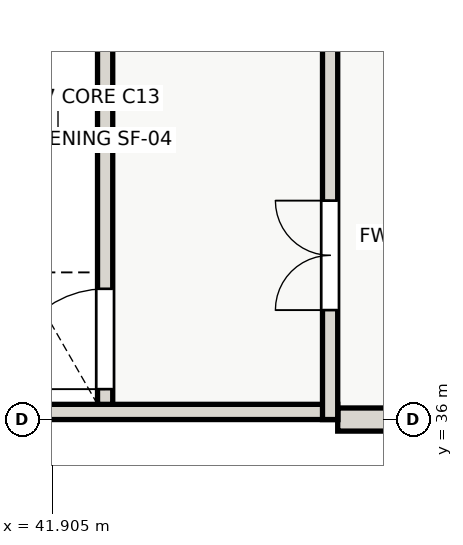
"""IFC4 building model, lengths in metres.
Left out: names, types, materials, properties, quantities, classifications, styles, units other than length and angle.
Written with IfcOpenShell. Run it as: python <this file> out.ifc"""

import sys

from ifc_helpers import new_model, si_unit, direction, frame, frame_2d, origin, place, context, subcontext, project, spatial, rectangle, extrude, element, fill, save


model = new_model("IFC4")
c1 = context("Model", 3, precision=1e-05, world=origin(), true_north=direction((0.0, 1.0)))
c2 = subcontext(c1, "Body", "Model", "MODEL_VIEW")
j1 = project(units=[si_unit("LENGTHUNIT", "METRE"), si_unit("PLANEANGLEUNIT", "RADIAN")], contexts=[c1])
p1 = place(None, origin())
s1 = spatial("IfcSite", under=j1, at=p1, CompositionType="ELEMENT")
p2 = place(p1, origin())
s2 = spatial("IfcBuilding", under=s1, at=p2, CompositionType="ELEMENT")
p3 = place(p2, frame((0.0, 0.0, 8.4)))
s3 = spatial("IfcBuildingStorey", under=s2, at=p3, CompositionType="ELEMENT", Elevation=8.4)
p4 = place(p3, frame((48.0, 36.0, 0.0), z_axis=(0.0, 0.0, 1.0), x_axis=(-1.0, 0.0, 0.0)))
e1 = element("IfcWall", 1, at=p4, inside=s3, PredefinedType="SOLIDWALL", context=c2, shape_type="SweptSolid", body=[
    extrude(rectangle(XDim=1.4, YDim=0.38, at=frame_2d((0.7, 0.0))), origin(), (0.0, 0.0, 1.0), 3.69),
])
p5 = place(p3, frame((46.6, 36.125, 0.0), z_axis=(0.0, 0.0, 1.0), x_axis=(-1.0, 0.0, 0.0)))
e2 = element("IfcWall", 2, at=p5, inside=s3, PredefinedType="SHEAR", context=c2, shape_type="SweptSolid", body=[
    extrude(rectangle(XDim=9.2, YDim=0.25, at=frame_2d((4.6, 0.0))), origin(), (0.0, 0.0, 1.0), 4.2),
])
p6 = place(p3, frame((46.475, 36.0, 0.0), z_axis=(0.0, 0.0, 1.0), x_axis=(0.0, 1.0, 0.0)))
e3 = element("IfcWall", 3, at=p6, inside=s3, PredefinedType="SHEAR", context=c2, shape_type="SweptSolid", body=[
    extrude(rectangle(XDim=9.2, YDim=0.25, at=frame_2d((4.6, 0.0))), origin(), (0.0, 0.0, 1.0), 4.2),
])
p7 = place(p6, frame((1.8, 0.0, 0.0)))
e4 = element("IfcOpeningElement", 4, at=p7, cuts=e3, PredefinedType="OPENING", context=c2, shape_type="SweptSolid", body=[
    extrude(rectangle(XDim=1.8, YDim=2.15, at=frame_2d((0.9, 1.075))), frame((0.0, 0.135, 0.0), z_axis=(0.0, -1.0, 0.0), x_axis=(1.0, 0.0, 0.0)), (0.0, 0.0, 1.0), 0.27),
])
p8 = place(p3, frame((42.775, 36.25, 0.0), z_axis=(0.0, 0.0, 1.0), x_axis=(0.0, 1.0, 0.0)))
e5 = element("IfcWall", 5, at=p8, inside=s3, PredefinedType="SHEAR", context=c2, shape_type="SweptSolid", body=[
    extrude(rectangle(XDim=8.7, YDim=0.25, at=frame_2d((4.35, 0.0))), origin(), (0.0, 0.0, 1.0), 4.2),
])
p9 = place(p8, frame((0.25, 0.0, 0.0)))
e6 = element("IfcOpeningElement", 6, at=p9, cuts=e5, PredefinedType="OPENING", context=c2, shape_type="SweptSolid", body=[
    extrude(rectangle(XDim=1.65, YDim=2.1, at=frame_2d((0.825, 1.05))), frame((0.0, 0.135, 0.0), z_axis=(0.0, -1.0, 0.0), x_axis=(1.0, 0.0, 0.0)), (0.0, 0.0, 1.0), 0.27),
])
p10 = place(p7, origin())
e7 = element("IfcDoor", 7, at=p10, inside=s3, OperationType="DOUBLE_DOOR_SINGLE_SWING", PredefinedType="DOOR", context=c2, shape_type="SweptSolid", body=[
    extrude(rectangle(XDim=1.8, YDim=2.15, at=frame_2d((0.9, 1.075))), frame((0.0, 0.025, 0.0), z_axis=(0.0, -1.0, 0.0), x_axis=(1.0, 0.0, 0.0)), (0.0, 0.0, 1.0), 0.05),
])
fill(e4, e7)
p11 = place(p9, origin())
e8 = element("IfcDoor", 8, at=p11, inside=s3, OperationType="SINGLE_SWING_LEFT", PredefinedType="DOOR", context=c2, shape_type="SweptSolid", body=[
    extrude(rectangle(XDim=1.65, YDim=2.1, at=frame_2d((0.825, 1.05))), frame((0.0, 0.025, 0.0), z_axis=(0.0, -1.0, 0.0), x_axis=(1.0, 0.0, 0.0)), (0.0, 0.0, 1.0), 0.05),
])
fill(e6, e8)
save(model, sys.argv[1])
